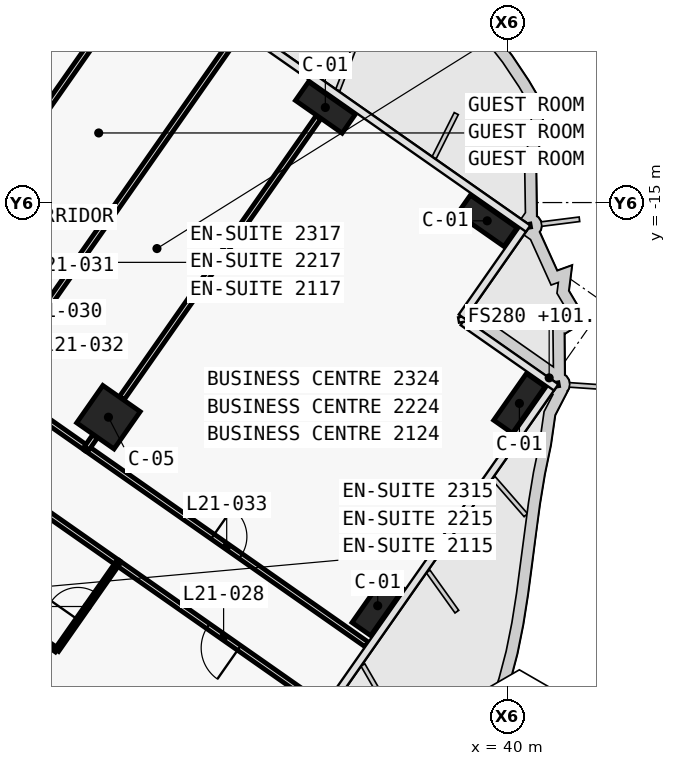
"""IFC4 building model, lengths in metres.
Left out: names, types, materials, properties, quantities, classifications, styles, units other than length and angle.
Written with IfcOpenShell. Run it as: python <this file> out.ifc"""

import sys

from ifc_helpers import new_model, si_unit, direction, frame, frame_2d, origin, origin_2d, place, context, subcontext, project, spatial, rectangle, extrude, element, fill, save


model = new_model("IFC4")
c1 = context("Model", 3, precision=1e-05, world=origin(), true_north=direction((0.0, 1.0)))
c2 = subcontext(c1, "Body", "Model", "MODEL_VIEW")
j1 = project(units=[si_unit("LENGTHUNIT", "METRE"), si_unit("PLANEANGLEUNIT", "RADIAN")], contexts=[c1])
p1 = place(None, origin())
s1 = spatial("IfcSite", under=j1, at=p1, CompositionType="ELEMENT")
p2 = place(p1, origin())
s2 = spatial("IfcBuilding", under=s1, at=p2, CompositionType="ELEMENT")
p3 = place(p2, frame((0.0, 0.0, 101.3)))
s3 = spatial("IfcBuildingStorey", under=s2, at=p3, CompositionType="ELEMENT", Elevation=101.3)
for number, where, z_axis, x_axis in (
    (1, (35.197, -12.498, 0.0), (0.0, 0.0, 1.0), (0.819, -0.574, 0.0)),
    (2, (39.456, -15.481, 0.0), (0.0, 0.0, 1.0), (0.819, -0.574, 0.0)),
    (3, (36.575, -25.61, 0.0), (0.0, 0.0, 1.0), (0.574, 0.819, 0.0)),
    (4, (40.303, -20.286, 0.0), (0.0, 0.0, 1.0), (0.574, 0.819, 0.0)),
):
    element("IfcColumn", number, at=place(p3, frame(where, z_axis=z_axis, x_axis=x_axis)), inside=s3, PredefinedType="COLUMN", context=c2, shape_type="SweptSolid", body=[
        extrude(rectangle(XDim=1.5, YDim=0.6, at=origin_2d()), origin(), (0.0, 0.0, 1.0), 3.6),
    ])
p4 = place(p3, frame((29.49, -20.649, 0.0), z_axis=(0.0, 0.0, 1.0), x_axis=(0.819152044289, -0.573576436351, 0.0)))
e5 = element("IfcColumn", 5, at=p4, inside=s3, PredefinedType="COLUMN", context=c2, shape_type="SweptSolid", body=[
    extrude(rectangle(XDim=1.2, YDim=1.2, at=origin_2d()), origin(), (0.0, 0.0, 1.0), 3.6),
])
p5 = place(p3, frame((26.457, -19.746, 0.0), z_axis=(0.0, 0.0, 1.0), x_axis=(0.81916700466, -0.573555070134, 0.0)))
e6 = element("IfcWall", 6, at=p5, inside=s3, PredefinedType="PARTITIONING", context=c2, shape_type="SweptSolid", body=[
    extrude(rectangle(XDim=3.004, YDim=0.15, at=frame_2d((1.502, 0.0))), origin(), (0.0, 0.0, 1.0), 2.6),
])
p6 = place(p5, frame((0.552, 0.0, 0.0)))
e7 = element("IfcOpeningElement", 7, at=p6, cuts=e6, PredefinedType="OPENING", context=c2, shape_type="SweptSolid", body=[
    extrude(rectangle(XDim=0.9, YDim=2.1, at=frame_2d((0.45, 1.05))), frame((0.0, 0.085, 0.0), z_axis=(0.0, -1.0, 0.0), x_axis=(1.0, 0.0, 0.0)), (0.0, 0.0, 1.0), 0.17),
])
p7 = place(p3, frame((28.914, -21.467, 0.0), z_axis=(0.0, 0.0, 1.0), x_axis=(0.81915291695, -0.57357519006, 0.0)))
e8 = element("IfcWall", 8, at=p7, inside=s3, PredefinedType="PARTITIONING", context=c2, shape_type="SweptSolid", body=[
    extrude(rectangle(XDim=9.002, YDim=0.15, at=frame_2d((4.501, 0.0))), origin(), (0.0, 0.0, 1.0), 2.5),
])
p8 = place(p7, frame((4.051, 0.0, 0.0)))
e9 = element("IfcOpeningElement", 9, at=p8, cuts=e8, PredefinedType="OPENING", context=c2, shape_type="SweptSolid", body=[
    extrude(rectangle(XDim=0.9, YDim=2.1, at=frame_2d((0.45, 1.05))), frame((0.0, 0.085, 0.0), z_axis=(0.0, -1.0, 0.0), x_axis=(1.0, 0.0, 0.0)), (0.0, 0.0, 1.0), 0.17),
])
p9 = place(p3, frame((35.141, -28.268, 0.0), z_axis=(0.0, 0.0, 1.0), x_axis=(-0.819155459934, 0.573571558274, 0.0)))
e10 = element("IfcWall", 10, at=p9, inside=s3, PredefinedType="PARTITIONING", context=c2, shape_type="SweptSolid", body=[
    extrude(rectangle(XDim=6.601, YDim=0.15, at=frame_2d((3.301, 0.0))), origin(), (0.0, 0.0, 1.0), 2.5),
])
p10 = place(p9, frame((2.7, 0.0, 0.0)))
e11 = element("IfcOpeningElement", 11, at=p10, cuts=e10, PredefinedType="OPENING", context=c2, shape_type="SweptSolid", body=[
    extrude(rectangle(XDim=1.0, YDim=2.1, at=frame_2d((0.5, 1.05))), frame((0.0, 0.085, 0.0), z_axis=(0.0, -1.0, 0.0), x_axis=(1.0, 0.0, 0.0)), (0.0, 0.0, 1.0), 0.17),
])
p11 = place(p3, frame((29.736, -24.484, 0.0), z_axis=(0.0, 0.0, 1.0), x_axis=(-0.819146032251, 0.573585022335, 0.0)))
e12 = element("IfcWall", 12, at=p11, inside=s3, PredefinedType="PARTITIONING", context=c2, shape_type="SweptSolid", body=[
    extrude(rectangle(XDim=2.404, YDim=0.15, at=frame_2d((1.202, 0.0))), origin(), (0.0, 0.0, 1.0), 2.6),
])
p12 = place(p3, frame((30.482, -8.77, 0.0), z_axis=(0.0, 0.0, 1.0), x_axis=(-0.573579093502, -0.819150183725, 0.0)))
e13 = element("IfcWall", 13, at=p12, inside=s3, PredefinedType="PARTITIONING", context=c2, shape_type="SweptSolid", body=[
    extrude(rectangle(XDim=8.701, YDim=0.15, at=frame_2d((4.351, 0.0))), origin(), (0.0, 0.0, 1.0), 2.6),
])
p13 = place(p3, frame((26.746, -12.014, 0.0), z_axis=(0.0, 0.0, 1.0), x_axis=(0.573560650686, 0.819163097304, 0.0)))
e14 = element("IfcWall", 14, at=p13, inside=s3, PredefinedType="PARTITIONING", context=c2, shape_type="SweptSolid", body=[
    extrude(rectangle(XDim=3.0, YDim=0.15, at=frame_2d((1.5, 0.0))), origin(), (0.0, 0.0, 1.0), 3.32),
])
p14 = place(p3, frame((32.94, -10.491, 0.0), z_axis=(0.0, 0.0, 1.0), x_axis=(-0.573571089604, -0.819155788095, 0.0)))
e15 = element("IfcWall", 15, at=p14, inside=s3, PredefinedType="PARTITIONING", context=c2, shape_type="SweptSolid", body=[
    extrude(rectangle(XDim=11.3, YDim=0.15, at=frame_2d((5.65, 0.0))), origin(), (0.0, 0.0, 1.0), 2.6),
])
p15 = place(p3, frame((35.013, -12.76, 0.0), z_axis=(0.0, 0.0, 1.0), x_axis=(-0.573558725113, -0.819164445546, 0.0)))
e16 = element("IfcWall", 16, at=p15, inside=s3, PredefinedType="PARTITIONING", context=c2, shape_type="SweptSolid", body=[
    extrude(rectangle(XDim=9.01, YDim=0.15, at=frame_2d((4.505, 0.0))), origin(), (0.0, 0.0, 1.0), 2.6),
])
p16 = place(p3, frame((29.134, -21.156, 0.0), z_axis=(0.0, 0.0, 1.0), x_axis=(-0.572944929411, -0.819593867633, 0.0)))
e17 = element("IfcWall", 17, at=p16, inside=s3, PredefinedType="PARTITIONING", context=c2, shape_type="SweptSolid", body=[
    extrude(rectangle(XDim=0.38, YDim=0.15, at=frame_2d((0.19, 0.0))), origin(), (0.0, 0.0, 1.0), 2.6),
])
p17 = place(p3, frame((26.162, -25.401, 0.0), z_axis=(0.0, 0.0, 1.0), x_axis=(0.819188907105, -0.573523787192, 0.0)))
e18 = element("IfcWall", 18, at=p17, inside=s3, PredefinedType="PARTITIONING", context=c2, shape_type="SweptSolid", body=[
    extrude(rectangle(XDim=2.4, YDim=0.12, at=frame_2d((1.2, 0.0))), origin(), (0.0, 0.0, 1.0), 2.6),
])
p18 = place(p3, frame((28.129, -26.777, 0.0), z_axis=(0.0, 0.0, 1.0), x_axis=(0.573608623498, 0.819129505664, 0.0)))
e19 = element("IfcWall", 19, at=p18, inside=s3, PredefinedType="PARTITIONING", context=c2, shape_type="SweptSolid", body=[
    extrude(rectangle(XDim=2.8, YDim=0.12, at=frame_2d((1.4, 0.0))), origin(), (0.0, 0.0, 1.0), 3.32),
])
p19 = place(p18, frame((0.975, 0.0, 0.0)))
e20 = element("IfcOpeningElement", 20, at=p19, cuts=e19, PredefinedType="OPENING", context=c2, shape_type="SweptSolid", body=[
    extrude(rectangle(XDim=0.85, YDim=2.05, at=frame_2d((0.425, 1.025))), frame((0.0, 0.07, 0.0), z_axis=(0.0, -1.0, 0.0), x_axis=(1.0, 0.0, 0.0)), (0.0, 0.0, 1.0), 0.14),
])
p20 = place(p19, origin())
e21 = element("IfcDoor", 21, at=p20, inside=s3, OperationType="SINGLE_SWING_LEFT", PredefinedType="DOOR", context=c2, shape_type="SweptSolid", body=[
    extrude(rectangle(XDim=0.85, YDim=2.05, at=frame_2d((0.425, 1.025))), frame((0.0, 0.025, 0.0), z_axis=(0.0, -1.0, 0.0), x_axis=(1.0, 0.0, 0.0)), (0.0, 0.0, 1.0), 0.05),
])
fill(e20, e21)
p21 = place(p10, origin())
e22 = element("IfcDoor", 22, at=p21, inside=s3, OperationType="SINGLE_SWING_RIGHT", PredefinedType="DOOR", context=c2, shape_type="SweptSolid", body=[
    extrude(rectangle(XDim=1.0, YDim=2.1, at=frame_2d((0.5, 1.05))), frame((0.0, 0.025, 0.0), z_axis=(0.0, -1.0, 0.0), x_axis=(1.0, 0.0, 0.0)), (0.0, 0.0, 1.0), 0.05),
])
fill(e11, e22)
p22 = place(p8, origin())
e23 = element("IfcDoor", 23, at=p22, inside=s3, OperationType="SINGLE_SWING_RIGHT", PredefinedType="DOOR", context=c2, shape_type="SweptSolid", body=[
    extrude(rectangle(XDim=0.9, YDim=2.1, at=frame_2d((0.45, 1.05))), frame((0.0, 0.025, 0.0), z_axis=(0.0, -1.0, 0.0), x_axis=(1.0, 0.0, 0.0)), (0.0, 0.0, 1.0), 0.05),
])
fill(e9, e23)
save(model, sys.argv[1])
